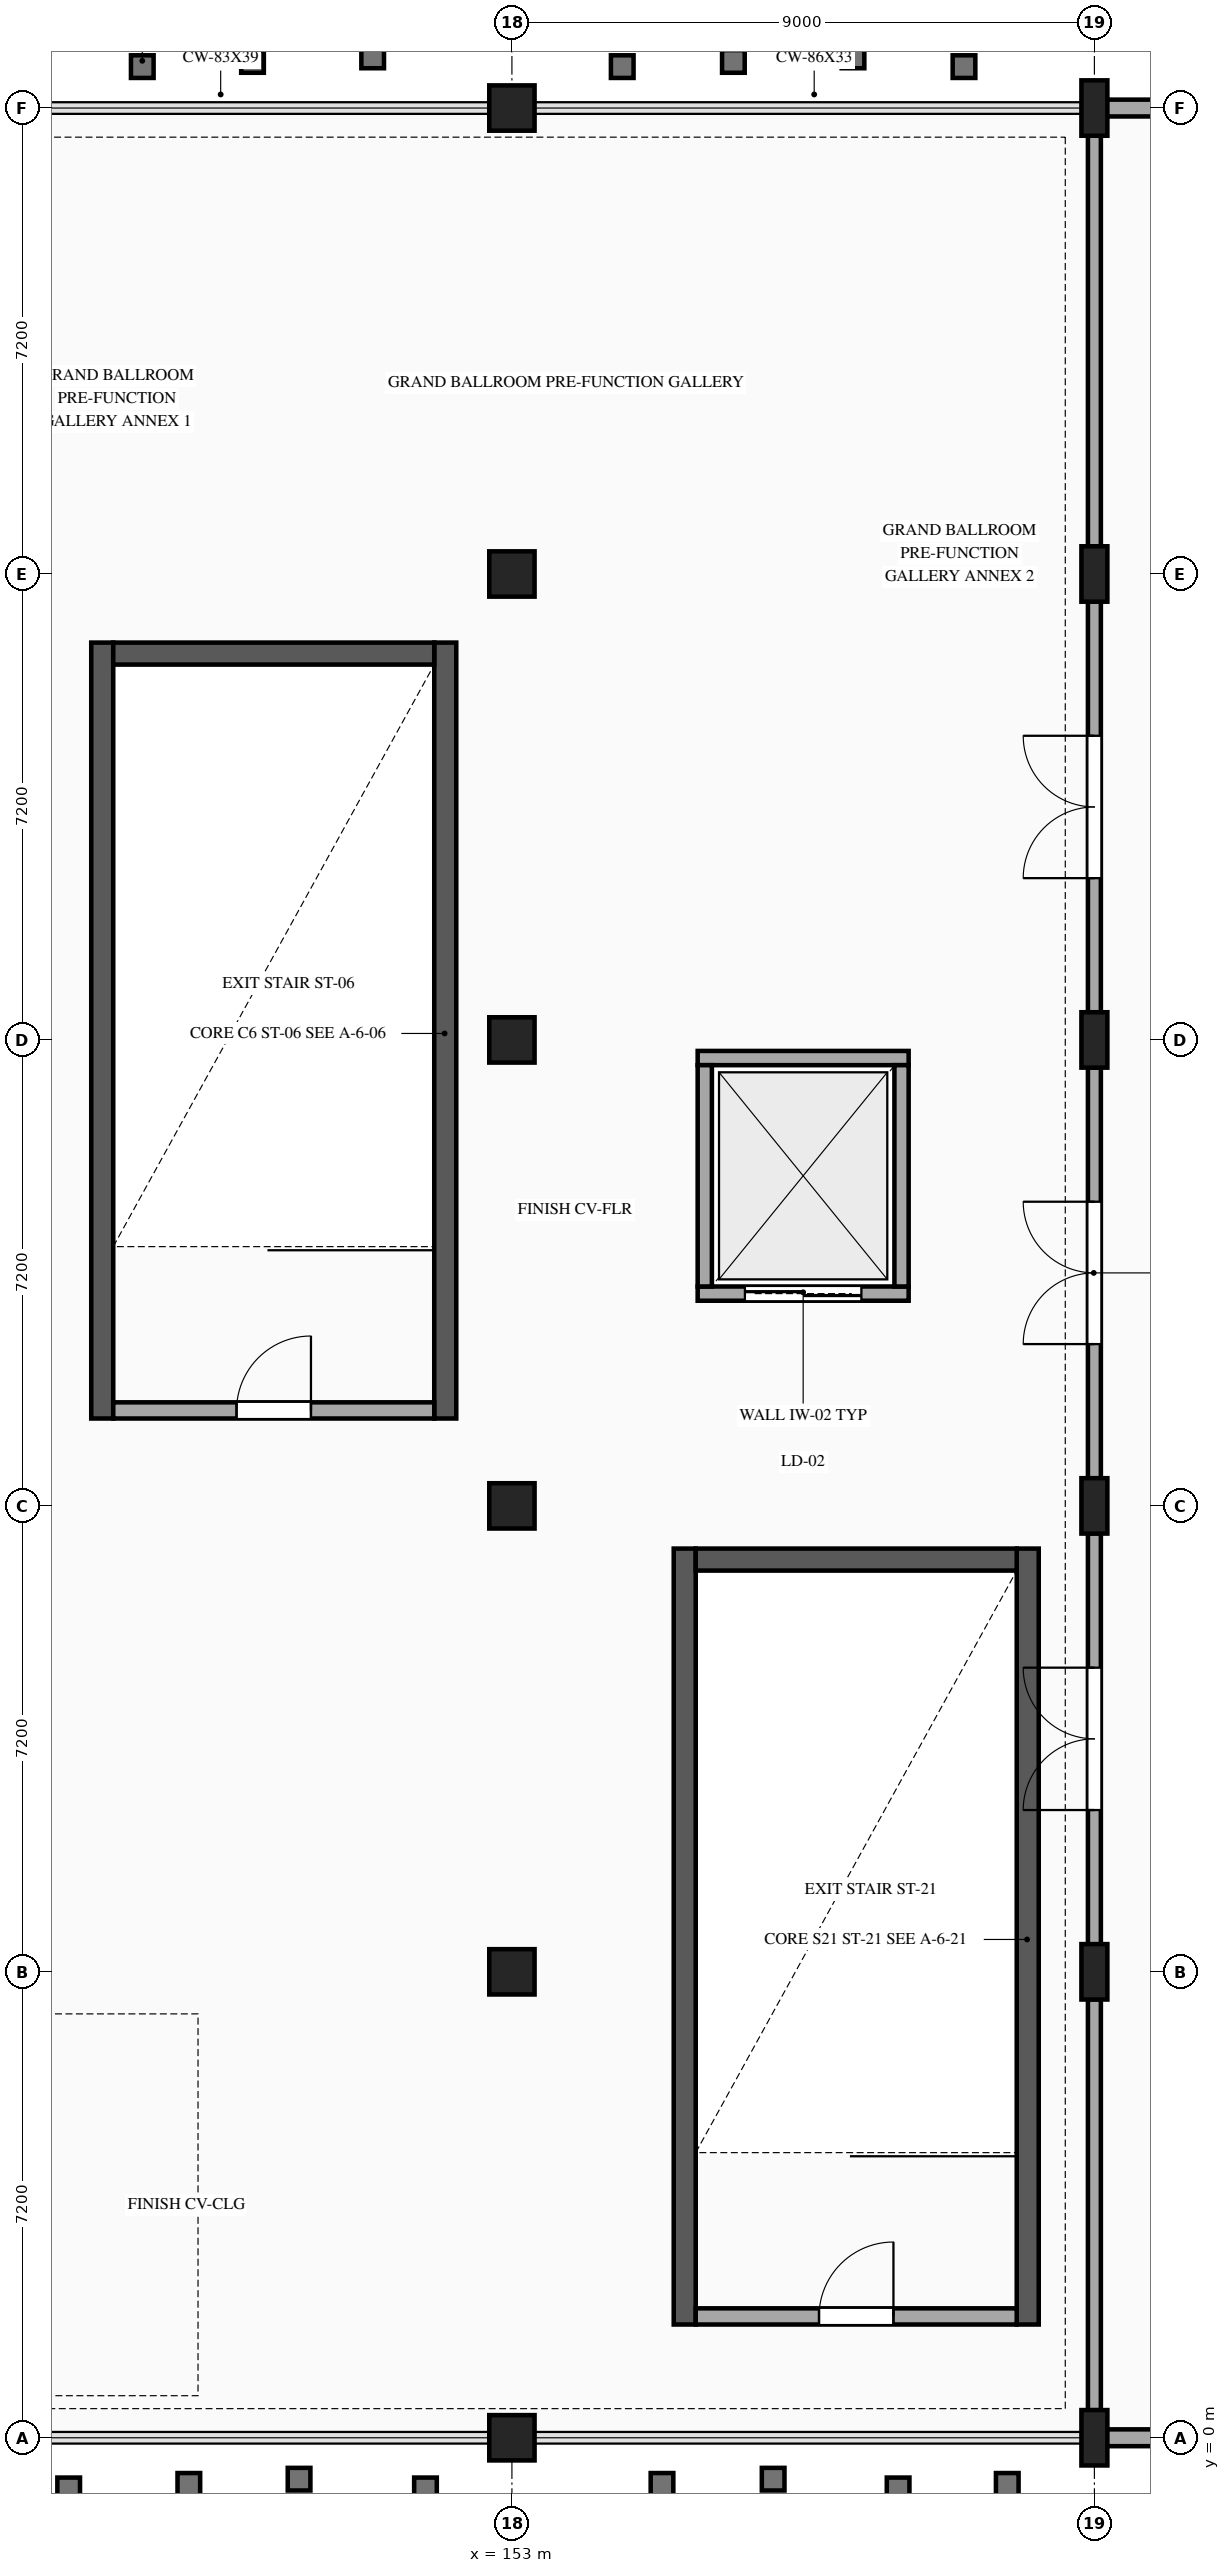
"""IFC4 building model, lengths in metres.
Left out: names, types, materials, properties, quantities, classifications, styles, units other than length and angle.
Written with IfcOpenShell. Run it as: python <this file> out.ifc"""

import sys

from ifc_helpers import new_model, si_unit, direction, frame, frame_2d, origin, origin_2d, place, context, subcontext, project, spatial, rectangle, i_section, extrude, element, fill, save


model = new_model("IFC4")
c1 = context("Model", 3, precision=1e-05, world=origin(), true_north=direction((0.0, 1.0)))
c2 = subcontext(c1, "Body", "Model", "MODEL_VIEW")
j1 = project(units=[si_unit("LENGTHUNIT", "METRE"), si_unit("PLANEANGLEUNIT", "RADIAN")], contexts=[c1])
p1 = place(None, origin())
s1 = spatial("IfcSite", under=j1, at=p1, CompositionType="ELEMENT")
p2 = place(p1, origin())
s2 = spatial("IfcBuilding", under=s1, at=p2, CompositionType="ELEMENT")
p3 = place(p2, frame((0.0, 0.0, 10.8)))
s3 = spatial("IfcBuildingStorey", under=s2, at=p3, CompositionType="ELEMENT", Elevation=10.8)
for number, where, z_axis, x_axis in (
    (1, (153.0, 0.0, 0.0), (0.0, 0.0, 1.0), (1.0, 0.0, 0.0)),
    (2, (153.0, 7.2, 0.0), (0.0, 0.0, 1.0), (1.0, 0.0, 0.0)),
    (3, (153.0, 14.4, 0.0), (0.0, 0.0, 1.0), (1.0, 0.0, 0.0)),
    (4, (153.0, 21.6, 0.0), (0.0, 0.0, 1.0), (1.0, 0.0, 0.0)),
    (5, (153.0, 28.8, 0.0), (0.0, 0.0, 1.0), (1.0, 0.0, 0.0)),
    (6, (153.0, 36.0, 0.0), (0.0, 0.0, 1.0), (1.0, 0.0, 0.0)),
):
    element("IfcColumn", number, at=place(p3, frame(where, z_axis=z_axis, x_axis=x_axis)), inside=s3, PredefinedType="COLUMN", context=c2, shape_type="SweptSolid", body=[
        extrude(rectangle(XDim=0.7, YDim=0.7, at=origin_2d()), origin(), (0.0, 0.0, 1.0), 4.5),
    ])
for number, where, z_axis, x_axis in (
    (7, (162.0, 0.0, 0.0), (0.0, 0.0, 1.0), (1.0, 0.0, 0.0)),
    (8, (162.0, 7.2, 0.0), (0.0, 0.0, 1.0), (1.0, 0.0, 0.0)),
    (9, (162.0, 14.4, 0.0), (0.0, 0.0, 1.0), (1.0, 0.0, 0.0)),
    (10, (162.0, 21.6, 0.0), (0.0, 0.0, 1.0), (1.0, 0.0, 0.0)),
    (11, (162.0, 28.8, 0.0), (0.0, 0.0, 1.0), (1.0, 0.0, 0.0)),
    (12, (162.0, 36.0, 0.0), (0.0, 0.0, 1.0), (1.0, 0.0, 0.0)),
):
    element("IfcColumn", number, at=place(p3, frame(where, z_axis=z_axis, x_axis=x_axis)), inside=s3, PredefinedType="COLUMN", context=c2, shape_type="SweptSolid", body=[
        extrude(i_section(OverallWidth=0.401, OverallDepth=0.856, WebThickness=0.018, FlangeThickness=0.029, at=origin_2d()), origin(), (0.0, 0.0, 1.0), 4.5),
    ])
for number, where, z_axis, x_axis in (
    (13, (146.67, 15.75, 0.0), (0.0, 0.0, 1.0), (0.0, 1.0, 0.0)),
    (14, (151.97, 27.74, 0.0), (0.0, 0.0, 1.0), (0.0, -1.0, 0.0)),
):
    element("IfcWall", number, at=place(p3, frame(where, z_axis=z_axis, x_axis=x_axis)), inside=s3, PredefinedType="SHEAR", context=c2, shape_type="SweptSolid", body=[
        extrude(rectangle(XDim=11.99, YDim=0.34, at=frame_2d((5.995, 0.0))), origin(), (0.0, 0.0, 1.0), 4.26),
    ])
p4 = place(p3, frame((146.84, 27.57, 0.0), z_axis=(0.0, 0.0, 1.0), x_axis=(1.0, 0.0, 0.0)))
e15 = element("IfcWall", 15, at=p4, inside=s3, PredefinedType="SHEAR", context=c2, shape_type="SweptSolid", body=[
    extrude(rectangle(XDim=4.96, YDim=0.34, at=frame_2d((2.48, 0.0))), origin(), (0.0, 0.0, 1.0), 4.26),
])
for number, where, z_axis, x_axis in (
    (16, (155.67, 1.75, 0.0), (0.0, 0.0, 1.0), (0.0, 1.0, 0.0)),
    (17, (160.97, 13.74, 0.0), (0.0, 0.0, 1.0), (0.0, -1.0, 0.0)),
):
    element("IfcWall", number, at=place(p3, frame(where, z_axis=z_axis, x_axis=x_axis)), inside=s3, PredefinedType="SHEAR", context=c2, shape_type="SweptSolid", body=[
        extrude(rectangle(XDim=11.99, YDim=0.34, at=frame_2d((5.995, 0.0))), origin(), (0.0, 0.0, 1.0), 4.26),
    ])
p5 = place(p3, frame((155.84, 13.57, 0.0), z_axis=(0.0, 0.0, 1.0), x_axis=(1.0, 0.0, 0.0)))
e18 = element("IfcWall", 18, at=p5, inside=s3, PredefinedType="SHEAR", context=c2, shape_type="SweptSolid", body=[
    extrude(rectangle(XDim=4.96, YDim=0.34, at=frame_2d((2.48, 0.0))), origin(), (0.0, 0.0, 1.0), 4.26),
])
p6 = place(p3, frame((170.993, 0.0, 0.0), z_axis=(0.0, 0.0, 1.0), x_axis=(-1.0, 0.0, 0.0)))
e19 = element("IfcWall", 19, at=p6, inside=s3, PredefinedType="STANDARD", context=c2, shape_type="SweptSolid", body=[
    extrude(rectangle(XDim=8.986, YDim=0.26, at=frame_2d((4.493, 0.0))), origin(), (0.0, 0.0, 1.0), 3.336),
])
p7 = place(p3, frame((162.007, 36.0, 0.0), z_axis=(0.0, 0.0, 1.0), x_axis=(1.0, 0.0, 0.0)))
e20 = element("IfcWall", 20, at=p7, inside=s3, PredefinedType="STANDARD", context=c2, shape_type="SweptSolid", body=[
    extrude(rectangle(XDim=8.986, YDim=0.26, at=frame_2d((4.493, 0.0))), origin(), (0.0, 0.0, 1.0), 3.336),
])
p8 = place(p7, frame((2.393, 0.0, 0.9)))
e21 = element("IfcOpeningElement", 21, at=p8, cuts=e20, PredefinedType="OPENING", context=c2, shape_type="SweptSolid", body=[
    extrude(rectangle(XDim=4.2, YDim=1.5, at=frame_2d((2.1, 0.75))), frame((0.0, 0.14, 0.0), z_axis=(0.0, -1.0, 0.0), x_axis=(1.0, 0.0, 0.0)), (0.0, 0.0, 1.0), 0.28),
])
p9 = place(p3, frame((146.84, 15.875, 0.0), z_axis=(0.0, 0.0, 1.0), x_axis=(1.0, 0.0, 0.0)))
e22 = element("IfcWall", 22, at=p9, inside=s3, PredefinedType="STANDARD", context=c2, shape_type="SweptSolid", body=[
    extrude(rectangle(XDim=4.96, YDim=0.25, at=frame_2d((2.48, 0.0))), origin(), (0.0, 0.0, 1.0), 4.22),
])
p10 = place(p9, frame((1.905, 0.0, 0.0)))
e23 = element("IfcOpeningElement", 23, at=p10, cuts=e22, PredefinedType="OPENING", context=c2, shape_type="SweptSolid", body=[
    extrude(rectangle(XDim=1.15, YDim=2.2, at=frame_2d((0.575, 1.1))), frame((0.0, 0.135, 0.0), z_axis=(0.0, -1.0, 0.0), x_axis=(1.0, 0.0, 0.0)), (0.0, 0.0, 1.0), 0.27),
])
p11 = place(p3, frame((155.87, 17.68, 0.0), z_axis=(0.0, 0.0, 1.0), x_axis=(1.0, 0.0, 0.0)))
e24 = element("IfcWall", 24, at=p11, inside=s3, PredefinedType="STANDARD", context=c2, shape_type="SweptSolid", body=[
    extrude(rectangle(XDim=3.26, YDim=0.22, at=frame_2d((1.63, 0.0))), origin(), (0.0, 0.0, 1.0), 3.577),
])
p12 = place(p11, frame((0.73, 0.0, 0.0)))
e25 = element("IfcOpeningElement", 25, at=p12, cuts=e24, PredefinedType="OPENING", context=c2, shape_type="SweptSolid", body=[
    extrude(rectangle(XDim=1.8, YDim=2.35, at=frame_2d((0.9, 1.175))), frame((0.0, 0.12, 0.0), z_axis=(0.0, -1.0, 0.0), x_axis=(1.0, 0.0, 0.0)), (0.0, 0.0, 1.0), 0.24),
])
p13 = place(p3, frame((159.13, 21.32, 0.0), z_axis=(0.0, 0.0, 1.0), x_axis=(-1.0, 0.0, 0.0)))
e26 = element("IfcWall", 26, at=p13, inside=s3, PredefinedType="STANDARD", context=c2, shape_type="SweptSolid", body=[
    extrude(rectangle(XDim=3.26, YDim=0.22, at=frame_2d((1.63, 0.0))), origin(), (0.0, 0.0, 1.0), 3.577),
])
for number, where, z_axis, x_axis in (
    (27, (155.98, 21.21, 0.0), (0.0, 0.0, 1.0), (0.0, -1.0, 0.0)),
    (28, (159.02, 17.79, 0.0), (0.0, 0.0, 1.0), (0.0, 1.0, 0.0)),
):
    element("IfcWall", number, at=place(p3, frame(where, z_axis=z_axis, x_axis=x_axis)), inside=s3, PredefinedType="STANDARD", context=c2, shape_type="SweptSolid", body=[
        extrude(rectangle(XDim=3.42, YDim=0.22, at=frame_2d((1.71, 0.0))), origin(), (0.0, 0.0, 1.0), 3.577),
    ])
p14 = place(p3, frame((155.84, 1.875, 0.0), z_axis=(0.0, 0.0, 1.0), x_axis=(1.0, 0.0, 0.0)))
e29 = element("IfcWall", 29, at=p14, inside=s3, PredefinedType="STANDARD", context=c2, shape_type="SweptSolid", body=[
    extrude(rectangle(XDim=4.96, YDim=0.25, at=frame_2d((2.48, 0.0))), origin(), (0.0, 0.0, 1.0), 4.22),
])
p15 = place(p14, frame((1.905, 0.0, 0.0)))
e30 = element("IfcOpeningElement", 30, at=p15, cuts=e29, PredefinedType="OPENING", context=c2, shape_type="SweptSolid", body=[
    extrude(rectangle(XDim=1.15, YDim=2.2, at=frame_2d((0.575, 1.1))), frame((0.0, 0.135, 0.0), z_axis=(0.0, -1.0, 0.0), x_axis=(1.0, 0.0, 0.0)), (0.0, 0.0, 1.0), 0.27),
])
p16 = place(p3, frame((162.0, 0.426, 0.0), z_axis=(0.0, 0.0, 1.0), x_axis=(0.0, 1.0, 0.0)))
e31 = element("IfcWall", 31, at=p16, inside=s3, PredefinedType="PARTITIONING", context=c2, shape_type="SweptSolid", body=[
    extrude(rectangle(XDim=6.348, YDim=0.2, at=frame_2d((3.174, 0.0))), origin(), (0.0, 0.0, 1.0), 4.01),
])
p17 = place(p3, frame((162.0, 7.626, 0.0), z_axis=(0.0, 0.0, 1.0), x_axis=(0.0, 1.0, 0.0)))
e32 = element("IfcWall", 32, at=p17, inside=s3, PredefinedType="PARTITIONING", context=c2, shape_type="SweptSolid", body=[
    extrude(rectangle(XDim=6.348, YDim=0.2, at=frame_2d((3.174, 0.0))), origin(), (0.0, 0.0, 1.0), 4.01),
])
p18 = place(p17, frame((2.074, 0.0, 0.0)))
e33 = element("IfcOpeningElement", 33, at=p18, cuts=e32, PredefinedType="OPENING", context=c2, shape_type="SweptSolid", body=[
    extrude(rectangle(XDim=2.2, YDim=2.5, at=frame_2d((1.1, 1.25))), frame((0.0, 0.11, 0.0), z_axis=(0.0, -1.0, 0.0), x_axis=(1.0, 0.0, 0.0)), (0.0, 0.0, 1.0), 0.22),
])
p19 = place(p3, frame((162.0, 14.826, 0.0), z_axis=(0.0, 0.0, 1.0), x_axis=(0.0, 1.0, 0.0)))
e34 = element("IfcWall", 34, at=p19, inside=s3, PredefinedType="PARTITIONING", context=c2, shape_type="SweptSolid", body=[
    extrude(rectangle(XDim=6.348, YDim=0.2, at=frame_2d((3.174, 0.0))), origin(), (0.0, 0.0, 1.0), 4.01),
])
p20 = place(p19, frame((2.074, 0.0, 0.0)))
e35 = element("IfcOpeningElement", 35, at=p20, cuts=e34, PredefinedType="OPENING", context=c2, shape_type="SweptSolid", body=[
    extrude(rectangle(XDim=2.2, YDim=2.5, at=frame_2d((1.1, 1.25))), frame((0.0, 0.11, 0.0), z_axis=(0.0, -1.0, 0.0), x_axis=(1.0, 0.0, 0.0)), (0.0, 0.0, 1.0), 0.22),
])
p21 = place(p3, frame((162.0, 22.026, 0.0), z_axis=(0.0, 0.0, 1.0), x_axis=(0.0, 1.0, 0.0)))
e36 = element("IfcWall", 36, at=p21, inside=s3, PredefinedType="PARTITIONING", context=c2, shape_type="SweptSolid", body=[
    extrude(rectangle(XDim=6.348, YDim=0.2, at=frame_2d((3.174, 0.0))), origin(), (0.0, 0.0, 1.0), 4.01),
])
p22 = place(p21, frame((2.074, 0.0, 0.0)))
e37 = element("IfcOpeningElement", 37, at=p22, cuts=e36, PredefinedType="OPENING", context=c2, shape_type="SweptSolid", body=[
    extrude(rectangle(XDim=2.2, YDim=2.5, at=frame_2d((1.1, 1.25))), frame((0.0, 0.11, 0.0), z_axis=(0.0, -1.0, 0.0), x_axis=(1.0, 0.0, 0.0)), (0.0, 0.0, 1.0), 0.22),
])
p23 = place(p3, frame((162.0, 29.226, 0.0), z_axis=(0.0, 0.0, 1.0), x_axis=(0.0, 1.0, 0.0)))
e38 = element("IfcWall", 38, at=p23, inside=s3, PredefinedType="PARTITIONING", context=c2, shape_type="SweptSolid", body=[
    extrude(rectangle(XDim=6.348, YDim=0.2, at=frame_2d((3.174, 0.0))), origin(), (0.0, 0.0, 1.0), 4.01),
])
p24 = place(p10, origin())
e39 = element("IfcDoor", 39, at=p24, inside=s3, OperationType="SINGLE_SWING_RIGHT", PredefinedType="DOOR", context=c2, shape_type="SweptSolid", body=[
    extrude(rectangle(XDim=1.15, YDim=2.2, at=frame_2d((0.575, 1.1))), frame((0.0, 0.025, 0.0), z_axis=(0.0, -1.0, 0.0), x_axis=(1.0, 0.0, 0.0)), (0.0, 0.0, 1.0), 0.05),
])
fill(e23, e39)
p25 = place(p12, origin())
e40 = element("IfcDoor", 40, at=p25, inside=s3, OperationType="DOUBLE_DOOR_SLIDING", PredefinedType="DOOR", context=c2, shape_type="SweptSolid", body=[
    extrude(rectangle(XDim=1.8, YDim=2.35, at=frame_2d((0.9, 1.175))), frame((0.0, 0.025, 0.0), z_axis=(0.0, -1.0, 0.0), x_axis=(1.0, 0.0, 0.0)), (0.0, 0.0, 1.0), 0.05),
])
fill(e25, e40)
p26 = place(p15, origin())
e41 = element("IfcDoor", 41, at=p26, inside=s3, OperationType="SINGLE_SWING_RIGHT", PredefinedType="DOOR", context=c2, shape_type="SweptSolid", body=[
    extrude(rectangle(XDim=1.15, YDim=2.2, at=frame_2d((0.575, 1.1))), frame((0.0, 0.025, 0.0), z_axis=(0.0, -1.0, 0.0), x_axis=(1.0, 0.0, 0.0)), (0.0, 0.0, 1.0), 0.05),
])
fill(e30, e41)
p27 = place(p18, origin())
e42 = element("IfcDoor", 42, at=p27, inside=s3, OperationType="DOUBLE_DOOR_SINGLE_SWING", PredefinedType="DOOR", context=c2, shape_type="SweptSolid", body=[
    extrude(rectangle(XDim=2.2, YDim=2.5, at=frame_2d((1.1, 1.25))), frame((0.0, 0.025, 0.0), z_axis=(0.0, -1.0, 0.0), x_axis=(1.0, 0.0, 0.0)), (0.0, 0.0, 1.0), 0.05),
])
fill(e33, e42)
p28 = place(p20, origin())
e43 = element("IfcDoor", 43, at=p28, inside=s3, OperationType="DOUBLE_DOOR_SINGLE_SWING", PredefinedType="DOOR", context=c2, shape_type="SweptSolid", body=[
    extrude(rectangle(XDim=2.2, YDim=2.5, at=frame_2d((1.1, 1.25))), frame((0.0, 0.025, 0.0), z_axis=(0.0, -1.0, 0.0), x_axis=(1.0, 0.0, 0.0)), (0.0, 0.0, 1.0), 0.05),
])
fill(e35, e43)
p29 = place(p22, origin())
e44 = element("IfcDoor", 44, at=p29, inside=s3, OperationType="DOUBLE_DOOR_SINGLE_SWING", PredefinedType="DOOR", context=c2, shape_type="SweptSolid", body=[
    extrude(rectangle(XDim=2.2, YDim=2.5, at=frame_2d((1.1, 1.25))), frame((0.0, 0.025, 0.0), z_axis=(0.0, -1.0, 0.0), x_axis=(1.0, 0.0, 0.0)), (0.0, 0.0, 1.0), 0.05),
])
fill(e37, e44)
save(model, sys.argv[1])
